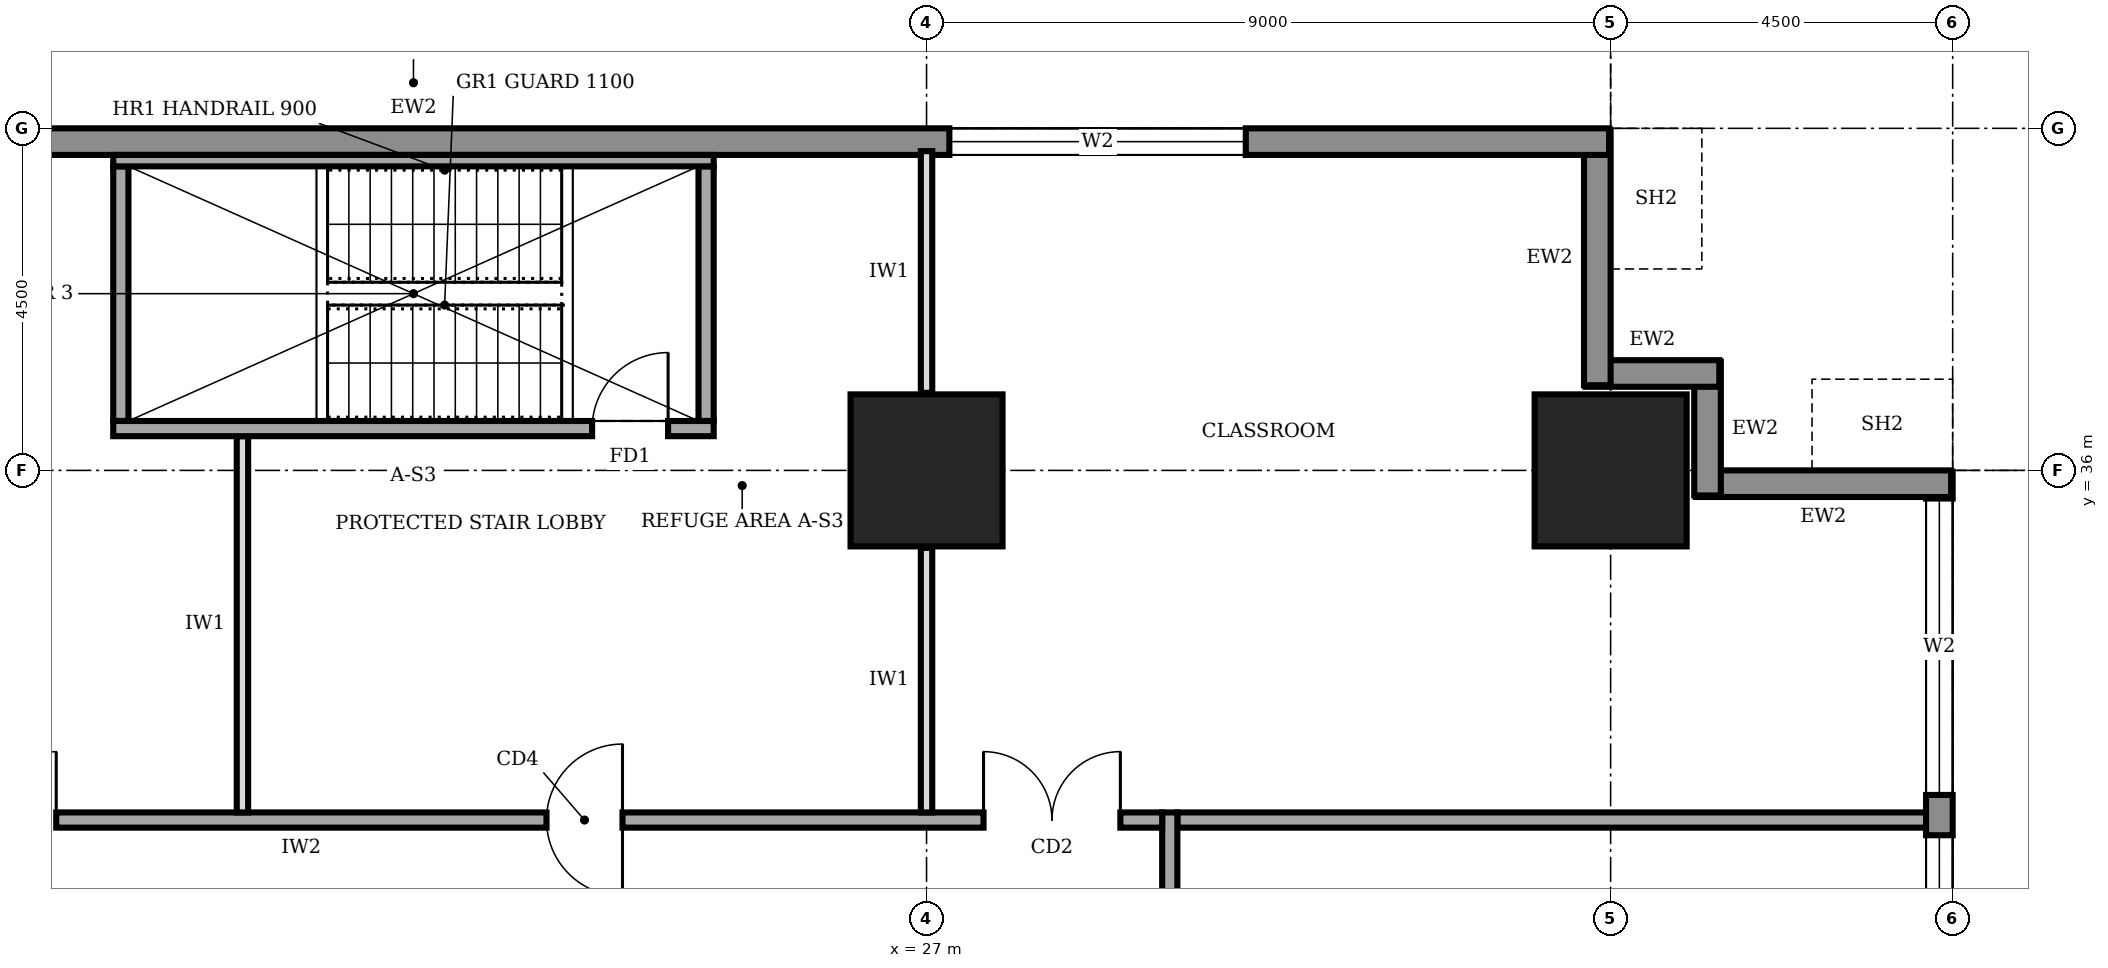
"""IFC4 building model, lengths in metres.
Left out: names, types, materials, properties, quantities, classifications, styles, units other than length and angle.
Written with IfcOpenShell. Run it as: python <this file> out.ifc"""

import sys

from ifc_helpers import new_model, si_unit, direction, frame, frame_2d, origin, origin_2d, place, context, subcontext, project, spatial, rectangle, extrude, element, fill, save


model = new_model("IFC4")
c1 = context("Model", 3, precision=1e-05, world=origin(), true_north=direction((0.0, 1.0)))
c2 = subcontext(c1, "Body", "Model", "MODEL_VIEW")
j1 = project(units=[si_unit("LENGTHUNIT", "METRE"), si_unit("PLANEANGLEUNIT", "RADIAN")], contexts=[c1])
p1 = place(None, origin())
s1 = spatial("IfcSite", under=j1, at=p1, CompositionType="ELEMENT")
p2 = place(p1, origin())
s2 = spatial("IfcBuilding", under=s1, at=p2, CompositionType="ELEMENT")
p3 = place(p2, frame((0.0, 0.0, 65.0)))
s3 = spatial("IfcBuildingStorey", under=s2, at=p3, CompositionType="ELEMENT", Elevation=65.0)
for number, where, z_axis, x_axis in (
    (1, (27.0, 36.0, 0.0), (0.0, 0.0, 1.0), (1.0, 0.0, 0.0)),
    (2, (36.0, 36.0, 0.0), (0.0, 0.0, 1.0), (1.0, 0.0, 0.0)),
):
    element("IfcColumn", number, at=place(p3, frame(where, z_axis=z_axis, x_axis=x_axis)), inside=s3, PredefinedType="COLUMN", context=c2, shape_type="SweptSolid", body=[
        extrude(rectangle(XDim=2.0, YDim=2.0, at=origin_2d()), origin(), (0.0, 0.0, 1.0), 4.0),
    ])
p4 = place(p3, frame((40.325, 4.52, 0.0), z_axis=(0.0, 0.0, 1.0), x_axis=(0.0, 1.0, 0.0)))
e3 = element("IfcWall", 3, at=p4, inside=s3, PredefinedType="STANDARD", context=c2, shape_type="SweptSolid", body=[
    extrude(rectangle(XDim=31.46, YDim=0.35, at=frame_2d((15.73, 0.0))), origin(), (0.0, 0.0, 1.0), 3.75),
])
p5 = place(p4, frame((4.78, 0.0, 0.6)))
e4 = element("IfcOpeningElement", 4, at=p5, cuts=e3, PredefinedType="OPENING", context=c2, shape_type="SweptSolid", body=[
    extrude(rectangle(XDim=3.9, YDim=2.6, at=frame_2d((1.95, 1.3))), frame((0.0, 0.185, 0.0), z_axis=(0.0, -1.0, 0.0), x_axis=(1.0, 0.0, 0.0)), (0.0, 0.0, 1.0), 0.37),
])
p6 = place(p4, frame((9.28, 0.0, 0.6)))
e5 = element("IfcOpeningElement", 5, at=p6, cuts=e3, PredefinedType="OPENING", context=c2, shape_type="SweptSolid", body=[
    extrude(rectangle(XDim=3.9, YDim=2.6, at=frame_2d((1.95, 1.3))), frame((0.0, 0.185, 0.0), z_axis=(0.0, -1.0, 0.0), x_axis=(1.0, 0.0, 0.0)), (0.0, 0.0, 1.0), 0.37),
])
p7 = place(p4, frame((13.78, 0.0, 0.6)))
e6 = element("IfcOpeningElement", 6, at=p7, cuts=e3, PredefinedType="OPENING", context=c2, shape_type="SweptSolid", body=[
    extrude(rectangle(XDim=3.9, YDim=2.6, at=frame_2d((1.95, 1.3))), frame((0.0, 0.185, 0.0), z_axis=(0.0, -1.0, 0.0), x_axis=(1.0, 0.0, 0.0)), (0.0, 0.0, 1.0), 0.37),
])
p8 = place(p4, frame((18.28, 0.0, 0.6)))
e7 = element("IfcOpeningElement", 7, at=p8, cuts=e3, PredefinedType="OPENING", context=c2, shape_type="SweptSolid", body=[
    extrude(rectangle(XDim=3.9, YDim=2.6, at=frame_2d((1.95, 1.3))), frame((0.0, 0.185, 0.0), z_axis=(0.0, -1.0, 0.0), x_axis=(1.0, 0.0, 0.0)), (0.0, 0.0, 1.0), 0.37),
])
p9 = place(p4, frame((22.78, 0.0, 0.6)))
e8 = element("IfcOpeningElement", 8, at=p9, cuts=e3, PredefinedType="OPENING", context=c2, shape_type="SweptSolid", body=[
    extrude(rectangle(XDim=3.9, YDim=2.6, at=frame_2d((1.95, 1.3))), frame((0.0, 0.185, 0.0), z_axis=(0.0, -1.0, 0.0), x_axis=(1.0, 0.0, 0.0)), (0.0, 0.0, 1.0), 0.37),
])
p10 = place(p4, frame((27.21, 0.0, 0.6)))
e9 = element("IfcOpeningElement", 9, at=p10, cuts=e3, PredefinedType="OPENING", context=c2, shape_type="SweptSolid", body=[
    extrude(rectangle(XDim=3.9, YDim=2.6, at=frame_2d((1.95, 1.3))), frame((0.0, 0.185, 0.0), z_axis=(0.0, -1.0, 0.0), x_axis=(1.0, 0.0, 0.0)), (0.0, 0.0, 1.0), 0.37),
])
p11 = place(p3, frame((40.48, 35.825, 0.0), z_axis=(0.0, 0.0, 1.0), x_axis=(-1.0, 0.0, 0.0)))
e10 = element("IfcWall", 10, at=p11, inside=s3, PredefinedType="STANDARD", context=c2, shape_type="SweptSolid", body=[
    extrude(rectangle(XDim=3.36, YDim=0.35, at=frame_2d((1.68, 0.0))), origin(), (0.0, 0.0, 1.0), 2.85),
])
for number, where, z_axis, x_axis in (
    (11, (37.275, 35.67, 0.0), (0.0, 0.0, 1.0), (0.0, 1.0, 0.0)),
    (12, (37.43, 37.275, 0.0), (0.0, 0.0, 1.0), (-1.0, 0.0, 0.0)),
):
    element("IfcWall", number, at=place(p3, frame(where, z_axis=z_axis, x_axis=x_axis)), inside=s3, PredefinedType="STANDARD", context=c2, shape_type="SweptSolid", body=[
        extrude(rectangle(XDim=1.76, YDim=0.35, at=frame_2d((0.88, 0.0))), origin(), (0.0, 0.0, 1.0), 3.75),
    ])
p12 = place(p3, frame((35.825, 37.12, 0.0), z_axis=(0.0, 0.0, 1.0), x_axis=(0.0, 1.0, 0.0)))
e13 = element("IfcWall", 13, at=p12, inside=s3, PredefinedType="STANDARD", context=c2, shape_type="SweptSolid", body=[
    extrude(rectangle(XDim=3.36, YDim=0.35, at=frame_2d((1.68, 0.0))), origin(), (0.0, 0.0, 1.0), 2.85),
])
p13 = place(p3, frame((35.98, 40.325, 0.0), z_axis=(0.0, 0.0, 1.0), x_axis=(-1.0, 0.0, 0.0)))
e14 = element("IfcWall", 14, at=p13, inside=s3, PredefinedType="STANDARD", context=c2, shape_type="SweptSolid", body=[
    extrude(rectangle(XDim=31.46, YDim=0.35, at=frame_2d((15.73, 0.0))), origin(), (0.0, 0.0, 1.0), 3.75),
])
p14 = place(p13, frame((27.21, 0.0, 0.6)))
e15 = element("IfcOpeningElement", 15, at=p14, cuts=e14, PredefinedType="OPENING", context=c2, shape_type="SweptSolid", body=[
    extrude(rectangle(XDim=3.9, YDim=2.6, at=frame_2d((1.95, 1.3))), frame((0.0, 0.185, 0.0), z_axis=(0.0, -1.0, 0.0), x_axis=(1.0, 0.0, 0.0)), (0.0, 0.0, 1.0), 0.37),
])
p15 = place(p13, frame((22.78, 0.0, 0.6)))
e16 = element("IfcOpeningElement", 16, at=p15, cuts=e14, PredefinedType="OPENING", context=c2, shape_type="SweptSolid", body=[
    extrude(rectangle(XDim=3.9, YDim=2.6, at=frame_2d((1.95, 1.3))), frame((0.0, 0.185, 0.0), z_axis=(0.0, -1.0, 0.0), x_axis=(1.0, 0.0, 0.0)), (0.0, 0.0, 1.0), 0.37),
])
p16 = place(p13, frame((4.78, 0.0, 0.6)))
e17 = element("IfcOpeningElement", 17, at=p16, cuts=e14, PredefinedType="OPENING", context=c2, shape_type="SweptSolid", body=[
    extrude(rectangle(XDim=3.9, YDim=2.6, at=frame_2d((1.95, 1.3))), frame((0.0, 0.185, 0.0), z_axis=(0.0, -1.0, 0.0), x_axis=(1.0, 0.0, 0.0)), (0.0, 0.0, 1.0), 0.37),
])
p17 = place(p3, frame((30.2, 9.2, 0.0), z_axis=(0.0, 0.0, 1.0), x_axis=(0.0, 1.0, 0.0)))
e18 = element("IfcWall", 18, at=p17, inside=s3, PredefinedType="SOLIDWALL", context=c2, shape_type="SweptSolid", body=[
    extrude(rectangle(XDim=22.3, YDim=0.2, at=frame_2d((11.15, 0.0))), origin(), (0.0, 0.0, 1.0), 3.75),
])
p18 = place(p17, frame((5.85, 0.0, 0.0)))
e19 = element("IfcOpeningElement", 19, at=p18, cuts=e18, PredefinedType="OPENING", context=c2, shape_type="SweptSolid", body=[
    extrude(rectangle(XDim=1.4, YDim=2.1, at=frame_2d((0.7, 1.05))), frame((0.0, 0.11, 0.0), z_axis=(0.0, -1.0, 0.0), x_axis=(1.0, 0.0, 0.0)), (0.0, 0.0, 1.0), 0.22),
])
p19 = place(p17, frame((17.3, 0.0, 0.0)))
e20 = element("IfcOpeningElement", 20, at=p19, cuts=e18, PredefinedType="OPENING", context=c2, shape_type="SweptSolid", body=[
    extrude(rectangle(XDim=1.0, YDim=2.1, at=frame_2d((0.5, 1.05))), frame((0.0, 0.11, 0.0), z_axis=(0.0, -1.0, 0.0), x_axis=(1.0, 0.0, 0.0)), (0.0, 0.0, 1.0), 0.22),
])
p20 = place(p3, frame((30.1, 31.4, 0.0), z_axis=(0.0, 0.0, 1.0), x_axis=(-1.0, 0.0, 0.0)))
e21 = element("IfcWall", 21, at=p20, inside=s3, PredefinedType="SOLIDWALL", context=c2, shape_type="SweptSolid", body=[
    extrude(rectangle(XDim=18.4, YDim=0.2, at=frame_2d((9.2, 0.0))), origin(), (0.0, 0.0, 1.0), 3.75),
])
p21 = place(p20, frame((14.55, 0.0, 0.0)))
e22 = element("IfcOpeningElement", 22, at=p21, cuts=e21, PredefinedType="OPENING", context=c2, shape_type="SweptSolid", body=[
    extrude(rectangle(XDim=1.4, YDim=2.1, at=frame_2d((0.7, 1.05))), frame((0.0, 0.11, 0.0), z_axis=(0.0, -1.0, 0.0), x_axis=(1.0, 0.0, 0.0)), (0.0, 0.0, 1.0), 0.22),
])
p22 = place(p20, frame((7.1, 0.0, 0.0)))
e23 = element("IfcOpeningElement", 23, at=p22, cuts=e21, PredefinedType="OPENING", context=c2, shape_type="SweptSolid", body=[
    extrude(rectangle(XDim=1.0, YDim=2.1, at=frame_2d((0.5, 1.05))), frame((0.0, 0.11, 0.0), z_axis=(0.0, -1.0, 0.0), x_axis=(1.0, 0.0, 0.0)), (0.0, 0.0, 1.0), 0.22),
])
p23 = place(p20, frame((0.55, 0.0, 0.0)))
e24 = element("IfcOpeningElement", 24, at=p23, cuts=e21, PredefinedType="OPENING", context=c2, shape_type="SweptSolid", body=[
    extrude(rectangle(XDim=1.8, YDim=2.1, at=frame_2d((0.9, 1.05))), frame((0.0, 0.11, 0.0), z_axis=(0.0, -1.0, 0.0), x_axis=(1.0, 0.0, 0.0)), (0.0, 0.0, 1.0), 0.22),
])
p24 = place(p3, frame((30.3, 31.4, 0.0), z_axis=(0.0, 0.0, 1.0), x_axis=(1.0, 0.0, 0.0)))
e25 = element("IfcWall", 25, at=p24, inside=s3, PredefinedType="SOLIDWALL", context=c2, shape_type="SweptSolid", body=[
    extrude(rectangle(XDim=9.9, YDim=0.2, at=frame_2d((4.95, 0.0))), origin(), (0.0, 0.0, 1.0), 3.75),
])
p25 = place(p3, frame((18.0, 31.5, 0.0), z_axis=(0.0, 0.0, 1.0), x_axis=(0.0, 1.0, 0.0)))
e26 = element("IfcWall", 26, at=p25, inside=s3, PredefinedType="PARTITIONING", context=c2, shape_type="SweptSolid", body=[
    extrude(rectangle(XDim=4.95, YDim=0.15, at=frame_2d((2.475, 0.0))), origin(), (0.0, 0.0, 1.0), 3.75),
])
p26 = place(p3, frame((27.0, 31.5, 0.0), z_axis=(0.0, 0.0, 1.0), x_axis=(0.0, 1.0, 0.0)))
e27 = element("IfcWall", 27, at=p26, inside=s3, PredefinedType="PARTITIONING", context=c2, shape_type="SweptSolid", body=[
    extrude(rectangle(XDim=3.48, YDim=0.15, at=frame_2d((1.74, 0.0))), origin(), (0.0, 0.0, 1.0), 2.85),
])
p27 = place(p3, frame((27.0, 37.02, 0.0), z_axis=(0.0, 0.0, 1.0), x_axis=(0.0, 1.0, 0.0)))
e28 = element("IfcWall", 28, at=p27, inside=s3, PredefinedType="PARTITIONING", context=c2, shape_type="SweptSolid", body=[
    extrude(rectangle(XDim=3.18, YDim=0.15, at=frame_2d((1.59, 0.0))), origin(), (0.0, 0.0, 1.0), 2.85),
])
p28 = place(p3, frame((16.3, 36.55, 0.0), z_axis=(0.0, 0.0, 1.0), x_axis=(1.0, 0.0, 0.0)))
e29 = element("IfcWall", 29, at=p28, inside=s3, PredefinedType="SOLIDWALL", context=c2, shape_type="SweptSolid", body=[
    extrude(rectangle(XDim=7.9, YDim=0.2, at=frame_2d((3.95, 0.0))), origin(), (0.0, 0.0, 1.0), 3.75),
])
p29 = place(p28, frame((6.3, 0.0, 0.0)))
e30 = element("IfcOpeningElement", 30, at=p29, cuts=e29, PredefinedType="OPENING", context=c2, shape_type="SweptSolid", body=[
    extrude(rectangle(XDim=1.0, YDim=2.1, at=frame_2d((0.5, 1.05))), frame((0.0, 0.11, 0.0), z_axis=(0.0, -1.0, 0.0), x_axis=(1.0, 0.0, 0.0)), (0.0, 0.0, 1.0), 0.22),
])
p30 = place(p3, frame((16.3, 40.075, 0.0), z_axis=(0.0, 0.0, 1.0), x_axis=(1.0, 0.0, 0.0)))
e31 = element("IfcWall", 31, at=p30, inside=s3, PredefinedType="SOLIDWALL", context=c2, shape_type="SweptSolid", body=[
    extrude(rectangle(XDim=7.9, YDim=0.15, at=frame_2d((3.95, 0.0))), origin(), (0.0, 0.0, 1.0), 3.75),
])
for number, where, z_axis, x_axis in (
    (32, (16.4, 36.65, 0.0), (0.0, 0.0, 1.0), (0.0, 1.0, 0.0)),
    (33, (24.1, 36.65, 0.0), (0.0, 0.0, 1.0), (0.0, 1.0, 0.0)),
):
    element("IfcWall", number, at=place(p3, frame(where, z_axis=z_axis, x_axis=x_axis)), inside=s3, PredefinedType="SOLIDWALL", context=c2, shape_type="SweptSolid", body=[
        extrude(rectangle(XDim=3.35, YDim=0.2, at=frame_2d((1.675, 0.0))), origin(), (0.0, 0.0, 1.0), 3.75),
    ])
p31 = place(p9, origin())
e34 = element("IfcWindow", 34, at=p31, inside=s3, PartitioningType="SINGLE_PANEL", PredefinedType="WINDOW", context=c2, shape_type="SweptSolid", body=[
    extrude(rectangle(XDim=3.9, YDim=2.6, at=frame_2d((1.95, 1.3))), frame((0.0, 0.03, 0.0), z_axis=(0.0, -1.0, 0.0), x_axis=(1.0, 0.0, 0.0)), (0.0, 0.0, 1.0), 0.06),
])
fill(e8, e34)
p32 = place(p10, origin())
e35 = element("IfcWindow", 35, at=p32, inside=s3, PartitioningType="SINGLE_PANEL", PredefinedType="WINDOW", context=c2, shape_type="SweptSolid", body=[
    extrude(rectangle(XDim=3.9, YDim=2.6, at=frame_2d((1.95, 1.3))), frame((0.0, 0.03, 0.0), z_axis=(0.0, -1.0, 0.0), x_axis=(1.0, 0.0, 0.0)), (0.0, 0.0, 1.0), 0.06),
])
fill(e9, e35)
p33 = place(p16, origin())
e36 = element("IfcWindow", 36, at=p33, inside=s3, PartitioningType="SINGLE_PANEL", PredefinedType="WINDOW", context=c2, shape_type="SweptSolid", body=[
    extrude(rectangle(XDim=3.9, YDim=2.6, at=frame_2d((1.95, 1.3))), frame((0.0, 0.03, 0.0), z_axis=(0.0, -1.0, 0.0), x_axis=(1.0, 0.0, 0.0)), (0.0, 0.0, 1.0), 0.06),
])
fill(e17, e36)
p34 = place(p21, frame((1.4, 0.0, 0.0), z_axis=(0.0, 0.0, 1.0), x_axis=(-1.0, 0.0, 0.0)))
e37 = element("IfcDoor", 37, at=p34, inside=s3, OperationType="DOUBLE_DOOR_SINGLE_SWING", PredefinedType="DOOR", context=c2, shape_type="SweptSolid", body=[
    extrude(rectangle(XDim=1.4, YDim=2.1, at=frame_2d((0.7, 1.05))), frame((0.0, 0.025, 0.0), z_axis=(0.0, -1.0, 0.0), x_axis=(1.0, 0.0, 0.0)), (0.0, 0.0, 1.0), 0.05),
])
fill(e22, e37)
p35 = place(p22, origin())
e38 = element("IfcDoor", 38, at=p35, inside=s3, OperationType="DOUBLE_SWING_LEFT", PredefinedType="DOOR", context=c2, shape_type="SweptSolid", body=[
    extrude(rectangle(XDim=1.0, YDim=2.1, at=frame_2d((0.5, 1.05))), frame((0.0, 0.025, 0.0), z_axis=(0.0, -1.0, 0.0), x_axis=(1.0, 0.0, 0.0)), (0.0, 0.0, 1.0), 0.05),
])
fill(e23, e38)
p36 = place(p23, frame((1.8, 0.0, 0.0), z_axis=(0.0, 0.0, 1.0), x_axis=(-1.0, 0.0, 0.0)))
e39 = element("IfcDoor", 39, at=p36, inside=s3, OperationType="DOUBLE_DOOR_SINGLE_SWING", PredefinedType="DOOR", context=c2, shape_type="SweptSolid", body=[
    extrude(rectangle(XDim=1.8, YDim=2.1, at=frame_2d((0.9, 1.05))), frame((0.0, 0.025, 0.0), z_axis=(0.0, -1.0, 0.0), x_axis=(1.0, 0.0, 0.0)), (0.0, 0.0, 1.0), 0.05),
])
fill(e24, e39)
p37 = place(p29, origin())
e40 = element("IfcDoor", 40, at=p37, inside=s3, OperationType="SINGLE_SWING_RIGHT", PredefinedType="DOOR", context=c2, shape_type="SweptSolid", body=[
    extrude(rectangle(XDim=1.0, YDim=2.1, at=frame_2d((0.5, 1.05))), frame((0.0, 0.025, 0.0), z_axis=(0.0, -1.0, 0.0), x_axis=(1.0, 0.0, 0.0)), (0.0, 0.0, 1.0), 0.05),
])
fill(e30, e40)
save(model, sys.argv[1])
